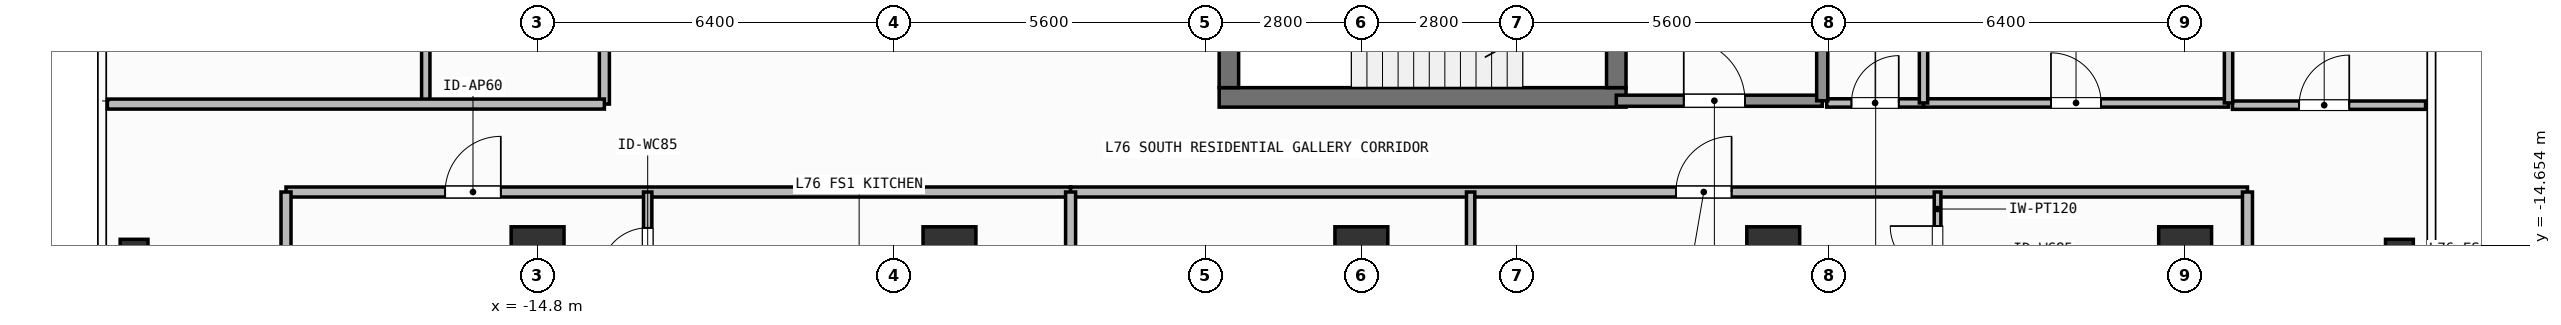
"""IFC4 building model, lengths in metres.
Left out: names, types, materials, properties, quantities, classifications, styles, units other than length and angle.
Written with IfcOpenShell. Run it as: python <this file> out.ifc"""

import sys

from ifc_helpers import new_model, si_unit, direction, frame, frame_2d, origin, origin_2d, place, context, subcontext, project, spatial, rectangle, hollow_rectangle, extrude, element, fill, save


model = new_model("IFC4")
c1 = context("Model", 3, precision=1e-05, world=origin(), true_north=direction((0.0, 1.0)))
c2 = subcontext(c1, "Body", "Model", "MODEL_VIEW")
j1 = project(units=[si_unit("LENGTHUNIT", "METRE"), si_unit("PLANEANGLEUNIT", "RADIAN")], contexts=[c1])
p1 = place(None, origin())
s1 = spatial("IfcSite", under=j1, at=p1, CompositionType="ELEMENT")
p2 = place(p1, origin())
s2 = spatial("IfcBuilding", under=s1, at=p2, CompositionType="ELEMENT")
p3 = place(p2, frame((0.0, 0.0, 309.3)))
s3 = spatial("IfcBuildingStorey", under=s2, at=p3, CompositionType="ELEMENT", Elevation=309.3)
p4 = place(p3, frame((-2.555, -12.0, 0.0), z_axis=(0.0, 0.0, 1.0), x_axis=(1.0, 0.0, 0.0)))
e1 = element("IfcWall", 1, at=p4, inside=s3, PredefinedType="SHEAR", context=c2, shape_type="SweptSolid", body=[
    extrude(rectangle(XDim=7.31, YDim=0.35, at=frame_2d((3.655, 0.0))), origin(), (0.0, 0.0, 1.0), 3.9),
])
p5 = place(p3, frame((-2.38, -11.825, 0.0), z_axis=(0.0, 0.0, 1.0), x_axis=(0.0, 1.0, 0.0)))
e2 = element("IfcWall", 2, at=p5, inside=s3, PredefinedType="SHEAR", context=c2, shape_type="SweptSolid", body=[
    extrude(rectangle(XDim=2.925, YDim=0.35, at=frame_2d((1.462, 0.0))), origin(), (0.0, 0.0, 1.0), 3.9),
])
p6 = place(p3, frame((4.58, -8.9, 0.0), z_axis=(0.0, 0.0, 1.0), x_axis=(0.0, -1.0, 0.0)))
e3 = element("IfcWall", 3, at=p6, inside=s3, PredefinedType="SHEAR", context=c2, shape_type="SweptSolid", body=[
    extrude(rectangle(XDim=2.925, YDim=0.35, at=frame_2d((1.462, 0.0))), origin(), (0.0, 0.0, 1.0), 3.9),
])
p7 = place(p6, frame((0.913, 0.0, 0.0)))
e4 = element("IfcOpeningElement", 4, at=p7, cuts=e3, PredefinedType="OPENING", context=c2, shape_type="SweptSolid", body=[
    extrude(rectangle(XDim=1.1, YDim=2.15, at=frame_2d((0.55, 1.075))), frame((0.0, 0.185, 0.0), z_axis=(0.0, -1.0, 0.0), x_axis=(1.0, 0.0, 0.0)), (0.0, 0.0, 1.0), 0.37),
])
for number, where, z_axis, x_axis in (
    (5, (-14.8, -14.8, 0.0), (0.0, 0.0, 1.0), (1.0, 0.0, 0.0)),
    (6, (-7.4, -14.8, 0.0), (0.0, 0.0, 1.0), (1.0, 0.0, 0.0)),
    (7, (0.0, -14.8, 0.0), (0.0, 0.0, 1.0), (1.0, 0.0, 0.0)),
    (8, (7.4, -14.8, 0.0), (0.0, 0.0, 1.0), (1.0, 0.0, 0.0)),
    (9, (14.8, -14.8, 0.0), (0.0, 0.0, 1.0), (1.0, 0.0, 0.0)),
):
    element("IfcColumn", number, at=place(p3, frame(where, z_axis=z_axis, x_axis=x_axis)), inside=s3, PredefinedType="COLUMN", context=c2, shape_type="SweptSolid", body=[
        extrude(rectangle(XDim=0.95, YDim=0.95, at=origin_2d()), origin(), (0.0, 0.0, 1.0), 3.9),
    ])
for number, where, z_axis, x_axis in (
    (10, (-22.05, -14.8, 0.0), (0.0, 0.0, 1.0), (1.0, 0.0, 0.0)),
    (11, (18.65, -14.8, 0.0), (0.0, 0.0, 1.0), (1.0, 0.0, 0.0)),
):
    element("IfcColumn", number, at=place(p3, frame(where, z_axis=z_axis, x_axis=x_axis)), inside=s3, PredefinedType="COLUMN", context=c2, shape_type="SweptSolid", body=[
        extrude(hollow_rectangle(XDim=0.5, YDim=0.5, WallThickness=0.025, at=origin_2d()), origin(), (0.0, 0.0, 1.0), 3.9),
    ])
p8 = place(p3, frame((4.58, -12.06, 0.0), z_axis=(0.0, 0.0, 1.0), x_axis=(1.0, 0.0, 0.0)))
e12 = element("IfcWall", 12, at=p8, inside=s3, PredefinedType="SOLIDWALL", context=c2, shape_type="SweptSolid", body=[
    extrude(rectangle(XDim=3.7, YDim=0.2, at=frame_2d((1.85, 0.0))), origin(), (0.0, 0.0, 1.0), 3.64),
])
p9 = place(p8, frame((1.212, 0.0, 0.0)))
e13 = element("IfcOpeningElement", 13, at=p9, cuts=e12, PredefinedType="OPENING", context=c2, shape_type="SweptSolid", body=[
    extrude(rectangle(XDim=1.1, YDim=2.15, at=frame_2d((0.55, 1.075))), frame((0.0, 0.11, 0.0), z_axis=(0.0, -1.0, 0.0), x_axis=(1.0, 0.0, 0.0)), (0.0, 0.0, 1.0), 0.22),
])
p10 = place(p3, frame((8.36, -12.1, 0.0), z_axis=(0.0, 0.0, 1.0), x_axis=(1.0, 0.0, 0.0)))
e14 = element("IfcWall", 14, at=p10, inside=s3, PredefinedType="PARTITIONING", context=c2, shape_type="SweptSolid", body=[
    extrude(rectangle(XDim=1.74, YDim=0.15, at=frame_2d((0.87, 0.0))), origin(), (0.0, 0.0, 1.0), 3.64),
])
p11 = place(p10, frame((0.445, 0.0, 0.0)))
e15 = element("IfcOpeningElement", 15, at=p11, cuts=e14, PredefinedType="OPENING", context=c2, shape_type="SweptSolid", body=[
    extrude(rectangle(XDim=0.85, YDim=2.1, at=frame_2d((0.425, 1.05))), frame((0.0, 0.085, 0.0), z_axis=(0.0, -1.0, 0.0), x_axis=(1.0, 0.0, 0.0)), (0.0, 0.0, 1.0), 0.17),
])
p12 = place(p3, frame((10.1, -12.1, 0.0), z_axis=(0.0, 0.0, 1.0), x_axis=(1.0, 0.0, 0.0)))
e16 = element("IfcWall", 16, at=p12, inside=s3, PredefinedType="PARTITIONING", context=c2, shape_type="SweptSolid", body=[
    extrude(rectangle(XDim=5.48, YDim=0.15, at=frame_2d((2.74, 0.0))), origin(), (0.0, 0.0, 1.0), 3.64),
])
p13 = place(p12, frame((2.29, 0.0, 0.0)))
e17 = element("IfcOpeningElement", 17, at=p13, cuts=e16, PredefinedType="OPENING", context=c2, shape_type="SweptSolid", body=[
    extrude(rectangle(XDim=0.9, YDim=2.1, at=frame_2d((0.45, 1.05))), frame((0.0, 0.085, 0.0), z_axis=(0.0, -1.0, 0.0), x_axis=(1.0, 0.0, 0.0)), (0.0, 0.0, 1.0), 0.17),
])
p14 = place(p3, frame((-19.32, -13.7, 0.0), z_axis=(0.0, 0.0, 1.0), x_axis=(1.0, 0.0, 0.0)))
e18 = element("IfcWall", 18, at=p14, inside=s3, PredefinedType="PARTITIONING", context=c2, shape_type="SweptSolid", body=[
    extrude(rectangle(XDim=14.096, YDim=0.18, at=frame_2d((7.048, 0.0))), origin(), (0.0, 0.0, 1.0), 3.64),
])
p15 = place(p14, frame((2.859, 0.0, 0.0)))
e19 = element("IfcOpeningElement", 19, at=p15, cuts=e18, PredefinedType="OPENING", context=c2, shape_type="SweptSolid", body=[
    extrude(rectangle(XDim=1.0, YDim=2.2, at=frame_2d((0.5, 1.1))), frame((0.0, 0.1, 0.0), z_axis=(0.0, -1.0, 0.0), x_axis=(1.0, 0.0, 0.0)), (0.0, 0.0, 1.0), 0.2),
])
p16 = place(p3, frame((-12.822, -15.837, 0.0), z_axis=(0.0, 0.0, 1.0), x_axis=(0.0, 1.0, 0.0)))
e20 = element("IfcWall", 20, at=p16, inside=s3, PredefinedType="PARTITIONING", context=c2, shape_type="SweptSolid", body=[
    extrude(rectangle(XDim=2.137, YDim=0.15, at=frame_2d((1.068, 0.0))), origin(), (0.0, 0.0, 1.0), 3.64),
])
p17 = place(p16, frame((0.644, 0.0, 0.0)))
e21 = element("IfcOpeningElement", 21, at=p17, cuts=e20, PredefinedType="OPENING", context=c2, shape_type="SweptSolid", body=[
    extrude(rectangle(XDim=0.85, YDim=2.1, at=frame_2d((0.425, 1.05))), frame((0.0, 0.085, 0.0), z_axis=(0.0, -1.0, 0.0), x_axis=(1.0, 0.0, 0.0)), (0.0, 0.0, 1.0), 0.17),
])
p18 = place(p3, frame((-5.224, -13.7, 0.0), z_axis=(0.0, 0.0, 1.0), x_axis=(1.0, 0.0, 0.0)))
e22 = element("IfcWall", 22, at=p18, inside=s3, PredefinedType="PARTITIONING", context=c2, shape_type="SweptSolid", body=[
    extrude(rectangle(XDim=21.144, YDim=0.18, at=frame_2d((10.572, 0.0))), origin(), (0.0, 0.0, 1.0), 3.64),
])
p19 = place(p18, frame((10.876, 0.0, 0.0)))
e23 = element("IfcOpeningElement", 23, at=p19, cuts=e22, PredefinedType="OPENING", context=c2, shape_type="SweptSolid", body=[
    extrude(rectangle(XDim=1.0, YDim=2.2, at=frame_2d((0.5, 1.1))), frame((0.0, 0.1, 0.0), z_axis=(0.0, -1.0, 0.0), x_axis=(1.0, 0.0, 0.0)), (0.0, 0.0, 1.0), 0.2),
])
p20 = place(p3, frame((1.963, -17.281, 0.0), z_axis=(0.0, 0.0, 1.0), x_axis=(0.0, 1.0, 0.0)))
e24 = element("IfcWall", 24, at=p20, inside=s3, PredefinedType="PARTITIONING", context=c2, shape_type="SweptSolid", body=[
    extrude(rectangle(XDim=3.581, YDim=0.15, at=frame_2d((1.791, 0.0))), origin(), (0.0, 0.0, 1.0), 3.64),
])
p21 = place(p20, frame((1.365, 0.0, 0.0)))
e25 = element("IfcOpeningElement", 25, at=p21, cuts=e24, PredefinedType="OPENING", context=c2, shape_type="SweptSolid", body=[
    extrude(rectangle(XDim=0.85, YDim=2.1, at=frame_2d((0.425, 1.05))), frame((0.0, 0.085, 0.0), z_axis=(0.0, -1.0, 0.0), x_axis=(1.0, 0.0, 0.0)), (0.0, 0.0, 1.0), 0.17),
])
p22 = place(p3, frame((10.352, -15.773, 0.0), z_axis=(0.0, 0.0, 1.0), x_axis=(0.0, 1.0, 0.0)))
e26 = element("IfcWall", 26, at=p22, inside=s3, PredefinedType="PARTITIONING", context=c2, shape_type="SweptSolid", body=[
    extrude(rectangle(XDim=2.073, YDim=0.12, at=frame_2d((1.037, 0.0))), origin(), (0.0, 0.0, 1.0), 3.64),
])
p23 = place(p22, frame((0.612, 0.0, 0.0)))
e27 = element("IfcOpeningElement", 27, at=p23, cuts=e26, PredefinedType="OPENING", context=c2, shape_type="SweptSolid", body=[
    extrude(rectangle(XDim=0.85, YDim=2.1, at=frame_2d((0.425, 1.05))), frame((0.0, 0.07, 0.0), z_axis=(0.0, -1.0, 0.0), x_axis=(1.0, 0.0, 0.0)), (0.0, 0.0, 1.0), 0.14),
])
p24 = place(p3, frame((-13.6, -12.12, 0.0), z_axis=(0.0, 0.0, 1.0), x_axis=(0.0, 1.0, 0.0)))
e28 = element("IfcWall", 28, at=p24, inside=s3, PredefinedType="PARTITIONING", context=c2, shape_type="SweptSolid", body=[
    extrude(rectangle(XDim=13.284, YDim=0.18, at=frame_2d((6.642, 0.0))), origin(), (0.0, 0.0, 1.0), 3.64),
])
p25 = place(p24, frame((5.338, 0.0, 0.0)))
e29 = element("IfcOpeningElement", 29, at=p25, cuts=e28, PredefinedType="OPENING", context=c2, shape_type="SweptSolid", body=[
    extrude(rectangle(XDim=1.0, YDim=2.2, at=frame_2d((0.5, 1.1))), frame((0.0, 0.1, 0.0), z_axis=(0.0, -1.0, 0.0), x_axis=(1.0, 0.0, 0.0)), (0.0, 0.0, 1.0), 0.2),
])
p26 = place(p3, frame((15.65, -12.14, 0.0), z_axis=(0.0, 0.0, 1.0), x_axis=(1.0, 0.0, 0.0)))
e30 = element("IfcWall", 30, at=p26, inside=s3, PredefinedType="PARTITIONING", context=c2, shape_type="SweptSolid", body=[
    extrude(rectangle(XDim=3.47, YDim=0.15, at=frame_2d((1.735, 0.0))), origin(), (0.0, 0.0, 1.0), 3.64),
])
p27 = place(p26, frame((1.198, 0.0, 0.0)))
e31 = element("IfcOpeningElement", 31, at=p27, cuts=e30, PredefinedType="OPENING", context=c2, shape_type="SweptSolid", body=[
    extrude(rectangle(XDim=0.9, YDim=2.1, at=frame_2d((0.45, 1.05))), frame((0.0, 0.085, 0.0), z_axis=(0.0, -1.0, 0.0), x_axis=(1.0, 0.0, 0.0)), (0.0, 0.0, 1.0), 0.17),
])
p28 = place(p3, frame((8.28, -12.06, 0.0), z_axis=(0.0, 0.0, 1.0), x_axis=(0.0, 1.0, 0.0)))
e32 = element("IfcWall", 32, at=p28, inside=s3, PredefinedType="SOLIDWALL", context=c2, shape_type="SweptSolid", body=[
    extrude(rectangle(XDim=3.335, YDim=0.2, at=frame_2d((1.667, 0.0))), origin(), (0.0, 0.0, 1.0), 3.64),
])
p29 = place(p3, frame((10.1, -12.1, 0.0), z_axis=(0.0, 0.0, 1.0), x_axis=(0.0, 1.0, 0.0)))
e33 = element("IfcWall", 33, at=p29, inside=s3, PredefinedType="PARTITIONING", context=c2, shape_type="SweptSolid", body=[
    extrude(rectangle(XDim=2.35, YDim=0.15, at=frame_2d((1.175, 0.0))), origin(), (0.0, 0.0, 1.0), 3.64),
])
p30 = place(p3, frame((15.58, -12.1, 0.0), z_axis=(0.0, 0.0, 1.0), x_axis=(0.0, 1.0, 0.0)))
e34 = element("IfcWall", 34, at=p30, inside=s3, PredefinedType="PARTITIONING", context=c2, shape_type="SweptSolid", body=[
    extrude(rectangle(XDim=6.25, YDim=0.15, at=frame_2d((3.125, 0.0))), origin(), (0.0, 0.0, 1.0), 3.33),
])
for number, where, z_axis, x_axis in (
    (35, (-19.32, -19.51, 0.0), (0.0, 0.0, 1.0), (0.0, 1.0, 0.0)),
    (36, (15.92, -19.51, 0.0), (0.0, 0.0, 1.0), (0.0, 1.0, 0.0)),
):
    element("IfcWall", number, at=place(p3, frame(where, z_axis=z_axis, x_axis=x_axis)), inside=s3, PredefinedType="PARTITIONING", context=c2, shape_type="SweptSolid", body=[
        extrude(rectangle(XDim=5.81, YDim=0.18, at=frame_2d((2.905, 0.0))), origin(), (0.0, 0.0, 1.0), 3.33),
    ])
p31 = place(p3, frame((-5.224, -20.63, 0.0), z_axis=(0.0, 0.0, 1.0), x_axis=(0.0, 1.0, 0.0)))
e37 = element("IfcWall", 37, at=p31, inside=s3, PredefinedType="PARTITIONING", context=c2, shape_type="SweptSolid", body=[
    extrude(rectangle(XDim=6.93, YDim=0.18, at=frame_2d((3.465, 0.0))), origin(), (0.0, 0.0, 1.0), 3.64),
])
p32 = place(p3, frame((-16.809, -12.12, 0.0), z_axis=(0.0, 0.0, 1.0), x_axis=(0.0, 1.0, 0.0)))
e38 = element("IfcWall", 38, at=p32, inside=s3, PredefinedType="PARTITIONING", context=c2, shape_type="SweptSolid", body=[
    extrude(rectangle(XDim=2.8, YDim=0.15, at=frame_2d((1.4, 0.0))), origin(), (0.0, 0.0, 1.0), 3.64),
])
p33 = place(p3, frame((-22.53, -12.12, 0.0), z_axis=(0.0, 0.0, 1.0), x_axis=(1.0, 0.0, 0.0)))
e39 = element("IfcWall", 39, at=p33, inside=s3, PredefinedType="PARTITIONING", context=c2, shape_type="SweptSolid", body=[
    extrude(rectangle(XDim=8.93, YDim=0.18, at=frame_2d((4.465, 0.0))), origin(), (0.0, 0.0, 1.0), 3.64),
])
p34 = place(p9, origin())
e40 = element("IfcDoor", 40, at=p34, inside=s3, OperationType="SINGLE_SWING_LEFT", PredefinedType="DOOR", context=c2, shape_type="SweptSolid", body=[
    extrude(rectangle(XDim=1.1, YDim=2.15, at=frame_2d((0.55, 1.075))), frame((0.0, 0.025, 0.0), z_axis=(0.0, -1.0, 0.0), x_axis=(1.0, 0.0, 0.0)), (0.0, 0.0, 1.0), 0.05),
])
fill(e13, e40)
p35 = place(p11, origin())
e41 = element("IfcDoor", 41, at=p35, inside=s3, OperationType="SINGLE_SWING_RIGHT", PredefinedType="DOOR", context=c2, shape_type="SweptSolid", body=[
    extrude(rectangle(XDim=0.85, YDim=2.1, at=frame_2d((0.425, 1.05))), frame((0.0, 0.025, 0.0), z_axis=(0.0, -1.0, 0.0), x_axis=(1.0, 0.0, 0.0)), (0.0, 0.0, 1.0), 0.05),
])
fill(e15, e41)
p36 = place(p13, origin())
e42 = element("IfcDoor", 42, at=p36, inside=s3, OperationType="SINGLE_SWING_LEFT", PredefinedType="DOOR", context=c2, shape_type="SweptSolid", body=[
    extrude(rectangle(XDim=0.9, YDim=2.1, at=frame_2d((0.45, 1.05))), frame((0.0, 0.025, 0.0), z_axis=(0.0, -1.0, 0.0), x_axis=(1.0, 0.0, 0.0)), (0.0, 0.0, 1.0), 0.05),
])
fill(e17, e42)
p37 = place(p15, origin())
e43 = element("IfcDoor", 43, at=p37, inside=s3, OperationType="SINGLE_SWING_RIGHT", PredefinedType="DOOR", context=c2, shape_type="SweptSolid", body=[
    extrude(rectangle(XDim=1.0, YDim=2.2, at=frame_2d((0.5, 1.1))), frame((0.0, 0.025, 0.0), z_axis=(0.0, -1.0, 0.0), x_axis=(1.0, 0.0, 0.0)), (0.0, 0.0, 1.0), 0.05),
])
fill(e19, e43)
p38 = place(p17, origin())
e44 = element("IfcDoor", 44, at=p38, inside=s3, OperationType="SINGLE_SWING_LEFT", PredefinedType="DOOR", context=c2, shape_type="SweptSolid", body=[
    extrude(rectangle(XDim=0.85, YDim=2.1, at=frame_2d((0.425, 1.05))), frame((0.0, 0.025, 0.0), z_axis=(0.0, -1.0, 0.0), x_axis=(1.0, 0.0, 0.0)), (0.0, 0.0, 1.0), 0.05),
])
fill(e21, e44)
p39 = place(p19, origin())
e45 = element("IfcDoor", 45, at=p39, inside=s3, OperationType="SINGLE_SWING_RIGHT", PredefinedType="DOOR", context=c2, shape_type="SweptSolid", body=[
    extrude(rectangle(XDim=1.0, YDim=2.2, at=frame_2d((0.5, 1.1))), frame((0.0, 0.025, 0.0), z_axis=(0.0, -1.0, 0.0), x_axis=(1.0, 0.0, 0.0)), (0.0, 0.0, 1.0), 0.05),
])
fill(e23, e45)
p40 = place(p23, origin())
e46 = element("IfcDoor", 46, at=p40, inside=s3, OperationType="SINGLE_SWING_RIGHT", PredefinedType="DOOR", context=c2, shape_type="SweptSolid", body=[
    extrude(rectangle(XDim=0.85, YDim=2.1, at=frame_2d((0.425, 1.05))), frame((0.0, 0.025, 0.0), z_axis=(0.0, -1.0, 0.0), x_axis=(1.0, 0.0, 0.0)), (0.0, 0.0, 1.0), 0.05),
])
fill(e27, e46)
p41 = place(p27, origin())
e47 = element("IfcDoor", 47, at=p41, inside=s3, OperationType="SINGLE_SWING_RIGHT", PredefinedType="DOOR", context=c2, shape_type="SweptSolid", body=[
    extrude(rectangle(XDim=0.9, YDim=2.1, at=frame_2d((0.45, 1.05))), frame((0.0, 0.025, 0.0), z_axis=(0.0, -1.0, 0.0), x_axis=(1.0, 0.0, 0.0)), (0.0, 0.0, 1.0), 0.05),
])
fill(e31, e47)
save(model, sys.argv[1])
